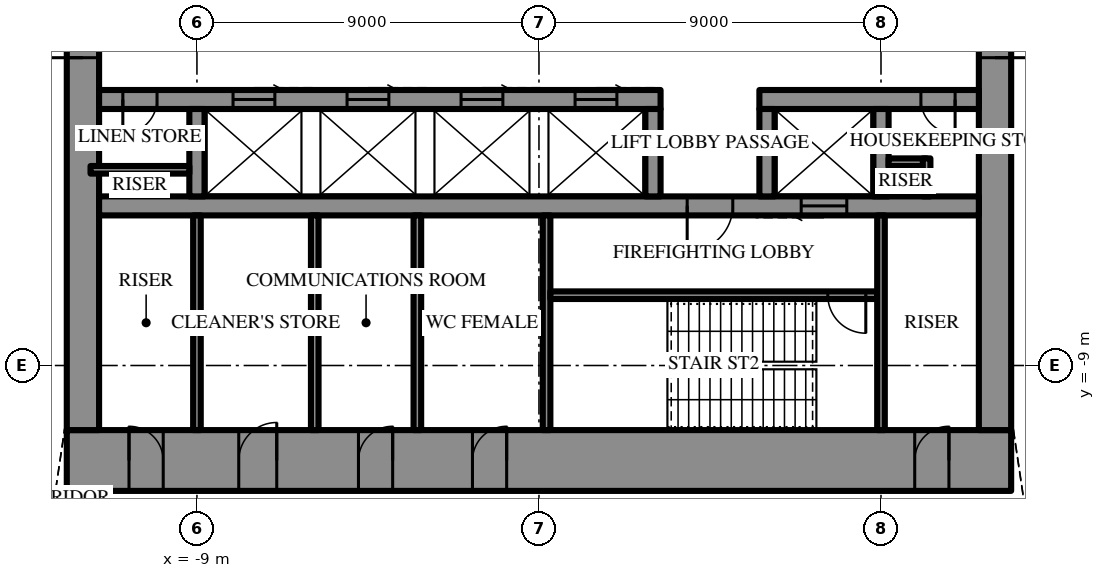
"""IFC4 building model, lengths in metres.
Left out: names, types, materials, properties, quantities, classifications, styles, units other than length and angle.
Written with IfcOpenShell. Run it as: python <this file> out.ifc"""

import sys

from ifc_helpers import new_model, si_unit, direction, frame, frame_2d, origin, place, context, subcontext, project, spatial, rectangle, extrude, element, fill, save


model = new_model("IFC4")
c1 = context("Model", 3, precision=1e-05, world=origin(), true_north=direction((0.0, 1.0)))
c2 = subcontext(c1, "Body", "Model", "MODEL_VIEW")
j1 = project(units=[si_unit("LENGTHUNIT", "METRE"), si_unit("PLANEANGLEUNIT", "RADIAN")], contexts=[c1])
p1 = place(None, origin())
s1 = spatial("IfcSite", under=j1, at=p1, CompositionType="ELEMENT")
p2 = place(p1, origin())
s2 = spatial("IfcBuilding", under=s1, at=p2, CompositionType="ELEMENT")
p3 = place(p2, frame((0.0, 0.0, 391.3)))
s3 = spatial("IfcBuildingStorey", under=s2, at=p3, CompositionType="ELEMENT", Elevation=391.3)
p4 = place(p3, frame((12.425, -11.5, 0.0), z_axis=(0.0, 0.0, 1.0), x_axis=(-1.0, 0.0, 0.0)))
e1 = element("IfcWall", 1, at=p4, inside=s3, PredefinedType="SHEAR", context=c2, shape_type="SweptSolid", body=[
    extrude(rectangle(XDim=24.85, YDim=1.6, at=frame_2d((12.425, 0.0))), origin(), (0.0, 0.0, 1.0), 5.0),
])
p5 = place(p4, frame((13.275, 0.0, 0.0)))
e2 = element("IfcOpeningElement", 2, at=p5, cuts=e1, PredefinedType="OPENING", context=c2, shape_type="SweptSolid", body=[
    extrude(rectangle(XDim=0.9, YDim=2.2, at=frame_2d((0.45, 1.1))), frame((0.0, 0.81, 0.0), z_axis=(0.0, -1.0, 0.0), x_axis=(1.0, 0.0, 0.0)), (0.0, 0.0, 1.0), 1.62),
])
p6 = place(p4, frame((16.275, 0.0, 0.0)))
e3 = element("IfcOpeningElement", 3, at=p6, cuts=e1, PredefinedType="OPENING", context=c2, shape_type="SweptSolid", body=[
    extrude(rectangle(XDim=0.9, YDim=2.2, at=frame_2d((0.45, 1.1))), frame((0.0, 0.81, 0.0), z_axis=(0.0, -1.0, 0.0), x_axis=(1.0, 0.0, 0.0)), (0.0, 0.0, 1.0), 1.62),
])
p7 = place(p4, frame((19.325, 0.0, 0.0)))
e4 = element("IfcOpeningElement", 4, at=p7, cuts=e1, PredefinedType="OPENING", context=c2, shape_type="SweptSolid", body=[
    extrude(rectangle(XDim=1.0, YDim=2.2, at=frame_2d((0.5, 1.1))), frame((0.0, 0.81, 0.0), z_axis=(0.0, -1.0, 0.0), x_axis=(1.0, 0.0, 0.0)), (0.0, 0.0, 1.0), 1.62),
])
p8 = place(p4, frame((1.637, 0.0, 0.0)))
e5 = element("IfcOpeningElement", 5, at=p8, cuts=e1, PredefinedType="OPENING", context=c2, shape_type="SweptSolid", body=[
    extrude(rectangle(XDim=0.9, YDim=2.2, at=frame_2d((0.45, 1.1))), frame((0.0, 0.81, 0.0), z_axis=(0.0, -1.0, 0.0), x_axis=(1.0, 0.0, 0.0)), (0.0, 0.0, 1.0), 1.62),
])
p9 = place(p4, frame((22.312, 0.0, 0.0)))
e6 = element("IfcOpeningElement", 6, at=p9, cuts=e1, PredefinedType="OPENING", context=c2, shape_type="SweptSolid", body=[
    extrude(rectangle(XDim=0.9, YDim=2.2, at=frame_2d((0.45, 1.1))), frame((0.0, 0.81, 0.0), z_axis=(0.0, -1.0, 0.0), x_axis=(1.0, 0.0, 0.0)), (0.0, 0.0, 1.0), 1.62),
])
p10 = place(p3, frame((12.0, -10.7, 0.0), z_axis=(0.0, 0.0, 1.0), x_axis=(0.0, 1.0, 0.0)))
e7 = element("IfcWall", 7, at=p10, inside=s3, PredefinedType="SHEAR", context=c2, shape_type="SweptSolid", body=[
    extrude(rectangle(XDim=21.4, YDim=0.85, at=frame_2d((10.7, 0.0))), origin(), (0.0, 0.0, 1.0), 5.0),
])
p11 = place(p10, frame((9.8, 0.0, 0.0)))
e8 = element("IfcOpeningElement", 8, at=p11, cuts=e7, PredefinedType="OPENING", context=c2, shape_type="SweptSolid", body=[
    extrude(rectangle(XDim=1.8, YDim=2.4, at=frame_2d((0.9, 1.2))), frame((0.0, 0.435, 0.0), z_axis=(0.0, -1.0, 0.0), x_axis=(1.0, 0.0, 0.0)), (0.0, 0.0, 1.0), 0.87),
])
p12 = place(p3, frame((-12.0, 10.7, 0.0), z_axis=(0.0, 0.0, 1.0), x_axis=(0.0, -1.0, 0.0)))
e9 = element("IfcWall", 9, at=p12, inside=s3, PredefinedType="SHEAR", context=c2, shape_type="SweptSolid", body=[
    extrude(rectangle(XDim=21.4, YDim=0.85, at=frame_2d((10.7, 0.0))), origin(), (0.0, 0.0, 1.0), 5.0),
])
p13 = place(p12, frame((9.8, 0.0, 0.0)))
e10 = element("IfcOpeningElement", 10, at=p13, cuts=e9, PredefinedType="OPENING", context=c2, shape_type="SweptSolid", body=[
    extrude(rectangle(XDim=1.8, YDim=2.4, at=frame_2d((0.9, 1.2))), frame((0.0, 0.435, 0.0), z_axis=(0.0, -1.0, 0.0), x_axis=(1.0, 0.0, 0.0)), (0.0, 0.0, 1.0), 0.87),
])
p14 = place(p3, frame((11.575, -2.0, 0.0), z_axis=(0.0, 0.0, 1.0), x_axis=(-1.0, 0.0, 0.0)))
e11 = element("IfcWall", 11, at=p14, inside=s3, PredefinedType="SHEAR", context=c2, shape_type="SweptSolid", body=[
    extrude(rectangle(XDim=5.775, YDim=0.5, at=frame_2d((2.887, 0.0))), origin(), (0.0, 0.0, 1.0), 5.0),
])
p15 = place(p14, frame((0.625, 0.0, 0.0)))
e12 = element("IfcOpeningElement", 12, at=p15, cuts=e11, PredefinedType="OPENING", context=c2, shape_type="SweptSolid", body=[
    extrude(rectangle(XDim=0.9, YDim=2.2, at=frame_2d((0.45, 1.1))), frame((0.0, 0.26, 0.0), z_axis=(0.0, -1.0, 0.0), x_axis=(1.0, 0.0, 0.0)), (0.0, 0.0, 1.0), 0.52),
])
p16 = place(p3, frame((3.2, -2.0, 0.0), z_axis=(0.0, 0.0, 1.0), x_axis=(-1.0, 0.0, 0.0)))
e13 = element("IfcWall", 13, at=p16, inside=s3, PredefinedType="SHEAR", context=c2, shape_type="SweptSolid", body=[
    extrude(rectangle(XDim=14.775, YDim=0.5, at=frame_2d((7.387, 0.0))), origin(), (0.0, 0.0, 1.0), 5.0),
])
p17 = place(p16, frame((13.25, 0.0, 0.0)))
e14 = element("IfcOpeningElement", 14, at=p17, cuts=e13, PredefinedType="OPENING", context=c2, shape_type="SweptSolid", body=[
    extrude(rectangle(XDim=0.9, YDim=2.2, at=frame_2d((0.45, 1.1))), frame((0.0, 0.26, 0.0), z_axis=(0.0, -1.0, 0.0), x_axis=(1.0, 0.0, 0.0)), (0.0, 0.0, 1.0), 0.52),
])
p18 = place(p16, frame((1.15, 0.0, 0.0)))
e15 = element("IfcOpeningElement", 15, at=p18, cuts=e13, PredefinedType="OPENING", context=c2, shape_type="SweptSolid", body=[
    extrude(rectangle(XDim=1.1, YDim=2.2, at=frame_2d((0.55, 1.1))), frame((0.0, 0.26, 0.0), z_axis=(0.0, -1.0, 0.0), x_axis=(1.0, 0.0, 0.0)), (0.0, 0.0, 1.0), 0.52),
])
p19 = place(p16, frame((4.15, 0.0, 0.0)))
e16 = element("IfcOpeningElement", 16, at=p19, cuts=e13, PredefinedType="OPENING", context=c2, shape_type="SweptSolid", body=[
    extrude(rectangle(XDim=1.1, YDim=2.2, at=frame_2d((0.55, 1.1))), frame((0.0, 0.26, 0.0), z_axis=(0.0, -1.0, 0.0), x_axis=(1.0, 0.0, 0.0)), (0.0, 0.0, 1.0), 0.52),
])
p20 = place(p16, frame((7.15, 0.0, 0.0)))
e17 = element("IfcOpeningElement", 17, at=p20, cuts=e13, PredefinedType="OPENING", context=c2, shape_type="SweptSolid", body=[
    extrude(rectangle(XDim=1.1, YDim=2.2, at=frame_2d((0.55, 1.1))), frame((0.0, 0.26, 0.0), z_axis=(0.0, -1.0, 0.0), x_axis=(1.0, 0.0, 0.0)), (0.0, 0.0, 1.0), 0.52),
])
p21 = place(p16, frame((10.15, 0.0, 0.0)))
e18 = element("IfcOpeningElement", 18, at=p21, cuts=e13, PredefinedType="OPENING", context=c2, shape_type="SweptSolid", body=[
    extrude(rectangle(XDim=1.1, YDim=2.2, at=frame_2d((0.55, 1.1))), frame((0.0, 0.26, 0.0), z_axis=(0.0, -1.0, 0.0), x_axis=(1.0, 0.0, 0.0)), (0.0, 0.0, 1.0), 0.52),
])
p22 = place(p3, frame((11.575, -4.8, 0.0), z_axis=(0.0, 0.0, 1.0), x_axis=(-1.0, 0.0, 0.0)))
e19 = element("IfcWall", 19, at=p22, inside=s3, PredefinedType="SHEAR", context=c2, shape_type="SweptSolid", body=[
    extrude(rectangle(XDim=23.15, YDim=0.5, at=frame_2d((11.575, 0.0))), origin(), (0.0, 0.0, 1.0), 5.0),
])
p23 = place(p22, frame((6.475, 0.0, 0.0)))
e20 = element("IfcOpeningElement", 20, at=p23, cuts=e19, PredefinedType="OPENING", context=c2, shape_type="SweptSolid", body=[
    extrude(rectangle(XDim=1.2, YDim=2.2, at=frame_2d((0.6, 1.1))), frame((0.0, 0.26, 0.0), z_axis=(0.0, -1.0, 0.0), x_axis=(1.0, 0.0, 0.0)), (0.0, 0.0, 1.0), 0.52),
])
p24 = place(p22, frame((3.475, 0.0, 0.0)))
e21 = element("IfcOpeningElement", 21, at=p24, cuts=e19, PredefinedType="OPENING", context=c2, shape_type="SweptSolid", body=[
    extrude(rectangle(XDim=1.2, YDim=2.2, at=frame_2d((0.6, 1.1))), frame((0.0, 0.26, 0.0), z_axis=(0.0, -1.0, 0.0), x_axis=(1.0, 0.0, 0.0)), (0.0, 0.0, 1.0), 0.52),
])
for number, where, z_axis, x_axis in (
    (22, (9.0, -2.25, 0.0), (0.0, 0.0, 1.0), (0.0, -1.0, 0.0)),
    (23, (6.0, -2.25, 0.0), (0.0, 0.0, 1.0), (0.0, -1.0, 0.0)),
    (24, (3.0, -2.25, 0.0), (0.0, 0.0, 1.0), (0.0, -1.0, 0.0)),
    (25, (-9.0, -2.25, 0.0), (0.0, 0.0, 1.0), (0.0, -1.0, 0.0)),
):
    element("IfcWall", number, at=place(p3, frame(where, z_axis=z_axis, x_axis=x_axis)), inside=s3, PredefinedType="SHEAR", context=c2, shape_type="SweptSolid", body=[
        extrude(rectangle(XDim=2.3, YDim=0.4, at=frame_2d((1.15, 0.0))), origin(), (0.0, 0.0, 1.0), 5.0),
    ])
p25 = place(p3, frame((0.2, -5.05, 0.0), z_axis=(0.0, 0.0, 1.0), x_axis=(0.0, -1.0, 0.0)))
e26 = element("IfcWall", 26, at=p25, inside=s3, PredefinedType="SHEAR", context=c2, shape_type="SweptSolid", body=[
    extrude(rectangle(XDim=5.65, YDim=0.2, at=frame_2d((2.825, 0.0))), origin(), (0.0, 0.0, 1.0), 5.0),
])
p26 = place(p3, frame((8.9, -7.15, 0.0), z_axis=(0.0, 0.0, 1.0), x_axis=(-1.0, 0.0, 0.0)))
e27 = element("IfcWall", 27, at=p26, inside=s3, PredefinedType="SHEAR", context=c2, shape_type="SweptSolid", body=[
    extrude(rectangle(XDim=8.6, YDim=0.2, at=frame_2d((4.3, 0.0))), origin(), (0.0, 0.0, 1.0), 5.0),
])
p27 = place(p26, frame((0.3, 0.0, 0.0)))
e28 = element("IfcOpeningElement", 28, at=p27, cuts=e27, PredefinedType="OPENING", context=c2, shape_type="SweptSolid", body=[
    extrude(rectangle(XDim=1.0, YDim=2.2, at=frame_2d((0.5, 1.1))), frame((0.0, 0.11, 0.0), z_axis=(0.0, -1.0, 0.0), x_axis=(1.0, 0.0, 0.0)), (0.0, 0.0, 1.0), 0.22),
])
for number, where, z_axis, x_axis in (
    (29, (9.0, -5.05, 0.0), (0.0, 0.0, 1.0), (0.0, -1.0, 0.0)),
    (30, (-9.0, -5.05, 0.0), (0.0, 0.0, 1.0), (0.0, -1.0, 0.0)),
    (31, (-3.2, -5.05, 0.0), (0.0, 0.0, 1.0), (0.0, -1.0, 0.0)),
    (32, (-5.9, -5.05, 0.0), (0.0, 0.0, 1.0), (0.0, -1.0, 0.0)),
):
    element("IfcWall", number, at=place(p3, frame(where, z_axis=z_axis, x_axis=x_axis)), inside=s3, PredefinedType="PARTITIONING", context=c2, shape_type="SweptSolid", body=[
        extrude(rectangle(XDim=5.65, YDim=0.2, at=frame_2d((2.825, 0.0))), origin(), (0.0, 0.0, 1.0), 4.7),
    ])
for number, where, z_axis, x_axis in (
    (33, (10.2, -3.65, 0.0), (0.0, 0.0, 1.0), (-1.0, 0.0, 0.0)),
    (34, (10.2, -3.55, 0.0), (0.0, 0.0, 1.0), (0.0, -1.0, 0.0)),
):
    element("IfcWall", number, at=place(p3, frame(where, z_axis=z_axis, x_axis=x_axis)), inside=s3, PredefinedType="PARTITIONING", context=c2, shape_type="SweptSolid", body=[
        extrude(rectangle(XDim=1.0, YDim=0.2, at=frame_2d((0.5, 0.0))), origin(), (0.0, 0.0, 1.0), 4.7),
    ])
p28 = place(p3, frame((-9.2, -3.85, 0.0), z_axis=(0.0, 0.0, 1.0), x_axis=(-1.0, 0.0, 0.0)))
e35 = element("IfcWall", 35, at=p28, inside=s3, PredefinedType="PARTITIONING", context=c2, shape_type="SweptSolid", body=[
    extrude(rectangle(XDim=2.6, YDim=0.2, at=frame_2d((1.3, 0.0))), origin(), (0.0, 0.0, 1.0), 4.7),
])
p29 = place(p11, frame((1.8, 0.0, 0.0), z_axis=(0.0, 0.0, 1.0), x_axis=(-1.0, 0.0, 0.0)))
e36 = element("IfcDoor", 36, at=p29, inside=s3, OperationType="DOUBLE_DOOR_SINGLE_SWING", PredefinedType="DOOR", context=c2, shape_type="SweptSolid", body=[
    extrude(rectangle(XDim=1.8, YDim=2.4, at=frame_2d((0.9, 1.2))), frame((0.0, 0.025, 0.0), z_axis=(0.0, -1.0, 0.0), x_axis=(1.0, 0.0, 0.0)), (0.0, 0.0, 1.0), 0.05),
])
fill(e8, e36)
p30 = place(p13, frame((1.8, 0.0, 0.0), z_axis=(0.0, 0.0, 1.0), x_axis=(-1.0, 0.0, 0.0)))
e37 = element("IfcDoor", 37, at=p30, inside=s3, OperationType="DOUBLE_DOOR_SINGLE_SWING", PredefinedType="DOOR", context=c2, shape_type="SweptSolid", body=[
    extrude(rectangle(XDim=1.8, YDim=2.4, at=frame_2d((0.9, 1.2))), frame((0.0, 0.025, 0.0), z_axis=(0.0, -1.0, 0.0), x_axis=(1.0, 0.0, 0.0)), (0.0, 0.0, 1.0), 0.05),
])
fill(e10, e37)
p31 = place(p23, origin())
e38 = element("IfcDoor", 38, at=p31, inside=s3, OperationType="SINGLE_SWING_LEFT", PredefinedType="DOOR", context=c2, shape_type="SweptSolid", body=[
    extrude(rectangle(XDim=1.2, YDim=2.2, at=frame_2d((0.6, 1.1))), frame((0.0, 0.025, 0.0), z_axis=(0.0, -1.0, 0.0), x_axis=(1.0, 0.0, 0.0)), (0.0, 0.0, 1.0), 0.05),
])
fill(e20, e38)
p32 = place(p27, origin())
e39 = element("IfcDoor", 39, at=p32, inside=s3, OperationType="SINGLE_SWING_RIGHT", PredefinedType="DOOR", context=c2, shape_type="SweptSolid", body=[
    extrude(rectangle(XDim=1.0, YDim=2.2, at=frame_2d((0.5, 1.1))), frame((0.0, 0.025, 0.0), z_axis=(0.0, -1.0, 0.0), x_axis=(1.0, 0.0, 0.0)), (0.0, 0.0, 1.0), 0.05),
])
fill(e28, e39)
p33 = place(p5, frame((0.9, 0.0, 0.0), z_axis=(0.0, 0.0, 1.0), x_axis=(-1.0, 0.0, 0.0)))
e40 = element("IfcDoor", 40, at=p33, inside=s3, OperationType="SINGLE_SWING_LEFT", PredefinedType="DOOR", context=c2, shape_type="SweptSolid", body=[
    extrude(rectangle(XDim=0.9, YDim=2.2, at=frame_2d((0.45, 1.1))), frame((0.0, 0.025, 0.0), z_axis=(0.0, -1.0, 0.0), x_axis=(1.0, 0.0, 0.0)), (0.0, 0.0, 1.0), 0.05),
])
fill(e2, e40)
p34 = place(p6, frame((0.9, 0.0, 0.0), z_axis=(0.0, 0.0, 1.0), x_axis=(-1.0, 0.0, 0.0)))
e41 = element("IfcDoor", 41, at=p34, inside=s3, OperationType="SINGLE_SWING_LEFT", PredefinedType="DOOR", context=c2, shape_type="SweptSolid", body=[
    extrude(rectangle(XDim=0.9, YDim=2.2, at=frame_2d((0.45, 1.1))), frame((0.0, 0.025, 0.0), z_axis=(0.0, -1.0, 0.0), x_axis=(1.0, 0.0, 0.0)), (0.0, 0.0, 1.0), 0.05),
])
fill(e3, e41)
p35 = place(p7, frame((1.0, 0.0, 0.0), z_axis=(0.0, 0.0, 1.0), x_axis=(-1.0, 0.0, 0.0)))
e42 = element("IfcDoor", 42, at=p35, inside=s3, OperationType="SINGLE_SWING_LEFT", PredefinedType="DOOR", context=c2, shape_type="SweptSolid", body=[
    extrude(rectangle(XDim=1.0, YDim=2.2, at=frame_2d((0.5, 1.1))), frame((0.0, 0.025, 0.0), z_axis=(0.0, -1.0, 0.0), x_axis=(1.0, 0.0, 0.0)), (0.0, 0.0, 1.0), 0.05),
])
fill(e4, e42)
p36 = place(p8, frame((0.9, 0.0, 0.0), z_axis=(0.0, 0.0, 1.0), x_axis=(-1.0, 0.0, 0.0)))
e43 = element("IfcDoor", 43, at=p36, inside=s3, OperationType="SINGLE_SWING_LEFT", PredefinedType="DOOR", context=c2, shape_type="SweptSolid", body=[
    extrude(rectangle(XDim=0.9, YDim=2.2, at=frame_2d((0.45, 1.1))), frame((0.0, 0.025, 0.0), z_axis=(0.0, -1.0, 0.0), x_axis=(1.0, 0.0, 0.0)), (0.0, 0.0, 1.0), 0.05),
])
fill(e5, e43)
p37 = place(p9, frame((0.9, 0.0, 0.0), z_axis=(0.0, 0.0, 1.0), x_axis=(-1.0, 0.0, 0.0)))
e44 = element("IfcDoor", 44, at=p37, inside=s3, OperationType="SINGLE_SWING_RIGHT", PredefinedType="DOOR", context=c2, shape_type="SweptSolid", body=[
    extrude(rectangle(XDim=0.9, YDim=2.2, at=frame_2d((0.45, 1.1))), frame((0.0, 0.025, 0.0), z_axis=(0.0, -1.0, 0.0), x_axis=(1.0, 0.0, 0.0)), (0.0, 0.0, 1.0), 0.05),
])
fill(e6, e44)
p38 = place(p15, origin())
e45 = element("IfcDoor", 45, at=p38, inside=s3, OperationType="SINGLE_SWING_RIGHT", PredefinedType="DOOR", context=c2, shape_type="SweptSolid", body=[
    extrude(rectangle(XDim=0.9, YDim=2.2, at=frame_2d((0.45, 1.1))), frame((0.0, 0.025, 0.0), z_axis=(0.0, -1.0, 0.0), x_axis=(1.0, 0.0, 0.0)), (0.0, 0.0, 1.0), 0.05),
])
fill(e12, e45)
p39 = place(p17, origin())
e46 = element("IfcDoor", 46, at=p39, inside=s3, OperationType="SINGLE_SWING_LEFT", PredefinedType="DOOR", context=c2, shape_type="SweptSolid", body=[
    extrude(rectangle(XDim=0.9, YDim=2.2, at=frame_2d((0.45, 1.1))), frame((0.0, 0.025, 0.0), z_axis=(0.0, -1.0, 0.0), x_axis=(1.0, 0.0, 0.0)), (0.0, 0.0, 1.0), 0.05),
])
fill(e14, e46)
p40 = place(p24, origin())
e47 = element("IfcDoor", 47, at=p40, inside=s3, OperationType="SLIDING_TO_LEFT", PredefinedType="DOOR", context=c2, shape_type="SweptSolid", body=[
    extrude(rectangle(XDim=1.2, YDim=2.2, at=frame_2d((0.6, 1.1))), frame((0.0, 0.025, 0.0), z_axis=(0.0, -1.0, 0.0), x_axis=(1.0, 0.0, 0.0)), (0.0, 0.0, 1.0), 0.05),
])
fill(e21, e47)
p41 = place(p18, frame((1.1, 0.0, 0.0), z_axis=(0.0, 0.0, 1.0), x_axis=(-1.0, 0.0, 0.0)))
e48 = element("IfcDoor", 48, at=p41, inside=s3, OperationType="SLIDING_TO_LEFT", PredefinedType="DOOR", context=c2, shape_type="SweptSolid", body=[
    extrude(rectangle(XDim=1.1, YDim=2.2, at=frame_2d((0.55, 1.1))), frame((0.0, 0.025, 0.0), z_axis=(0.0, -1.0, 0.0), x_axis=(1.0, 0.0, 0.0)), (0.0, 0.0, 1.0), 0.05),
])
fill(e15, e48)
p42 = place(p19, frame((1.1, 0.0, 0.0), z_axis=(0.0, 0.0, 1.0), x_axis=(-1.0, 0.0, 0.0)))
e49 = element("IfcDoor", 49, at=p42, inside=s3, OperationType="SLIDING_TO_LEFT", PredefinedType="DOOR", context=c2, shape_type="SweptSolid", body=[
    extrude(rectangle(XDim=1.1, YDim=2.2, at=frame_2d((0.55, 1.1))), frame((0.0, 0.025, 0.0), z_axis=(0.0, -1.0, 0.0), x_axis=(1.0, 0.0, 0.0)), (0.0, 0.0, 1.0), 0.05),
])
fill(e16, e49)
p43 = place(p20, frame((1.1, 0.0, 0.0), z_axis=(0.0, 0.0, 1.0), x_axis=(-1.0, 0.0, 0.0)))
e50 = element("IfcDoor", 50, at=p43, inside=s3, OperationType="SLIDING_TO_LEFT", PredefinedType="DOOR", context=c2, shape_type="SweptSolid", body=[
    extrude(rectangle(XDim=1.1, YDim=2.2, at=frame_2d((0.55, 1.1))), frame((0.0, 0.025, 0.0), z_axis=(0.0, -1.0, 0.0), x_axis=(1.0, 0.0, 0.0)), (0.0, 0.0, 1.0), 0.05),
])
fill(e17, e50)
p44 = place(p21, frame((1.1, 0.0, 0.0), z_axis=(0.0, 0.0, 1.0), x_axis=(-1.0, 0.0, 0.0)))
e51 = element("IfcDoor", 51, at=p44, inside=s3, OperationType="SLIDING_TO_LEFT", PredefinedType="DOOR", context=c2, shape_type="SweptSolid", body=[
    extrude(rectangle(XDim=1.1, YDim=2.2, at=frame_2d((0.55, 1.1))), frame((0.0, 0.025, 0.0), z_axis=(0.0, -1.0, 0.0), x_axis=(1.0, 0.0, 0.0)), (0.0, 0.0, 1.0), 0.05),
])
fill(e18, e51)
save(model, sys.argv[1])
